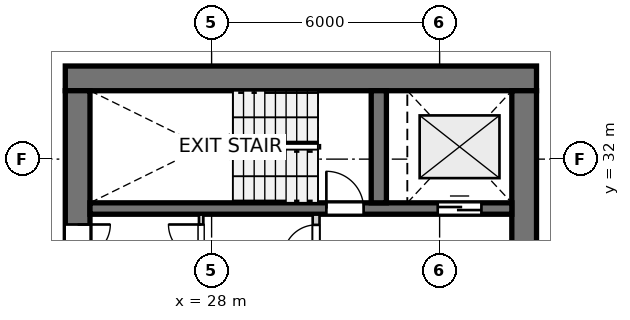
"""IFC4 building model, lengths in metres.
Left out: names, types, materials, properties, quantities, classifications, styles, units other than length and angle.
Written with IfcOpenShell. Run it as: python <this file> out.ifc"""

import sys

from ifc_helpers import new_model, si_unit, direction, frame, frame_2d, origin, place, context, subcontext, project, spatial, rectangle, extrude, source, transform, mapped, element, fill, save


model = new_model("IFC4")
c1 = context("Model", 3, precision=1e-05, world=origin(), true_north=direction((0.0, 1.0)))
c2 = subcontext(c1, "Body", "Model", "MODEL_VIEW")
j1 = project(units=[si_unit("LENGTHUNIT", "METRE"), si_unit("PLANEANGLEUNIT", "RADIAN")], contexts=[c1])
p1 = place(None, origin())
s1 = spatial("IfcSite", under=j1, at=p1, CompositionType="ELEMENT")
p2 = place(p1, origin())
s2 = spatial("IfcBuilding", under=s1, at=p2, CompositionType="ELEMENT")
p3 = place(p2, frame((0.0, 0.0, 108.8)))
s3 = spatial("IfcBuildingStorey", under=s2, at=p3, CompositionType="ELEMENT", Elevation=108.8)
p4 = place(p3, frame((36.55, 34.125, 0.0), z_axis=(0.0, 0.0, 1.0), x_axis=(-1.0, 0.0, 0.0)))
e1 = element("IfcWall", 1, at=p4, inside=s3, PredefinedType="SHEAR", context=c2, shape_type="SweptSolid", body=[
    extrude(rectangle(XDim=12.4, YDim=0.65, at=frame_2d((6.2, 0.0))), origin(), (0.0, 0.0, 1.0), 2.935),
])
p5 = place(p3, frame((24.475, 33.8, 0.0), z_axis=(0.0, 0.0, 1.0), x_axis=(0.0, -1.0, 0.0)))
e2 = element("IfcWall", 2, at=p5, inside=s3, PredefinedType="SHEAR", context=c2, shape_type="SweptSolid", body=[
    extrude(rectangle(XDim=15.6, YDim=0.65, at=frame_2d((7.8, 0.0))), origin(), (0.0, 0.0, 1.0), 2.935),
])
p6 = place(p5, frame((7.05, 0.0, 0.0)))
e3 = element("IfcOpeningElement", 3, at=p6, cuts=e2, PredefinedType="OPENING", context=c2, shape_type="SweptSolid", body=[
    extrude(rectangle(XDim=1.5, YDim=2.15, at=frame_2d((0.75, 1.075))), frame((0.0, 0.335, 0.0), z_axis=(0.0, -1.0, 0.0), x_axis=(1.0, 0.0, 0.0)), (0.0, 0.0, 1.0), 0.67),
])
p7 = place(p5, frame((3.52, 0.0, 0.0)))
e4 = element("IfcOpeningElement", 4, at=p7, cuts=e2, PredefinedType="OPENING", context=c2, shape_type="SweptSolid", body=[
    extrude(rectangle(XDim=0.86, YDim=2.05, at=frame_2d((0.43, 1.025))), frame((0.0, 0.335, 0.0), z_axis=(0.0, -1.0, 0.0), x_axis=(1.0, 0.0, 0.0)), (0.0, 0.0, 1.0), 0.67),
])
p8 = place(p5, frame((11.22, 0.0, 0.0)))
e5 = element("IfcOpeningElement", 5, at=p8, cuts=e2, PredefinedType="OPENING", context=c2, shape_type="SweptSolid", body=[
    extrude(rectangle(XDim=0.86, YDim=2.05, at=frame_2d((0.43, 1.025))), frame((0.0, 0.335, 0.0), z_axis=(0.0, -1.0, 0.0), x_axis=(1.0, 0.0, 0.0)), (0.0, 0.0, 1.0), 0.67),
])
p9 = place(p3, frame((36.225, 18.2, 0.0), z_axis=(0.0, 0.0, 1.0), x_axis=(0.0, 1.0, 0.0)))
e6 = element("IfcWall", 6, at=p9, inside=s3, PredefinedType="SHEAR", context=c2, shape_type="SweptSolid", body=[
    extrude(rectangle(XDim=15.6, YDim=0.65, at=frame_2d((7.8, 0.0))), origin(), (0.0, 0.0, 1.0), 2.935),
])
p10 = place(p9, frame((4.25, 0.0, 0.0)))
e7 = element("IfcOpeningElement", 7, at=p10, cuts=e6, PredefinedType="OPENING", context=c2, shape_type="SweptSolid", body=[
    extrude(rectangle(XDim=1.1, YDim=2.15, at=frame_2d((0.55, 1.075))), frame((0.0, 0.335, 0.0), z_axis=(0.0, -1.0, 0.0), x_axis=(1.0, 0.0, 0.0)), (0.0, 0.0, 1.0), 0.67),
])
p11 = place(p9, frame((10.25, 0.0, 0.0)))
e8 = element("IfcOpeningElement", 8, at=p11, cuts=e6, PredefinedType="OPENING", context=c2, shape_type="SweptSolid", body=[
    extrude(rectangle(XDim=1.1, YDim=2.15, at=frame_2d((0.55, 1.075))), frame((0.0, 0.335, 0.0), z_axis=(0.0, -1.0, 0.0), x_axis=(1.0, 0.0, 0.0)), (0.0, 0.0, 1.0), 0.67),
])
p12 = place(p3, frame((24.8, 30.7, 0.0), z_axis=(0.0, 0.0, 1.0), x_axis=(1.0, 0.0, 0.0)))
e9 = element("IfcWall", 9, at=p12, inside=s3, PredefinedType="SHEAR", context=c2, shape_type="SweptSolid", body=[
    extrude(rectangle(XDim=11.1, YDim=0.3, at=frame_2d((5.55, 0.0))), origin(), (0.0, 0.0, 1.0), 2.935),
])
p13 = place(p12, frame((6.22, 0.0, 0.0)))
e10 = element("IfcOpeningElement", 10, at=p13, cuts=e9, PredefinedType="OPENING", context=c2, shape_type="SweptSolid", body=[
    extrude(rectangle(XDim=0.98, YDim=2.15, at=frame_2d((0.49, 1.075))), frame((0.0, 0.16, 0.0), z_axis=(0.0, -1.0, 0.0), x_axis=(1.0, 0.0, 0.0)), (0.0, 0.0, 1.0), 0.32),
])
p14 = place(p12, frame((9.15, 0.0, 0.0)))
e11 = element("IfcOpeningElement", 11, at=p14, cuts=e9, PredefinedType="OPENING", context=c2, shape_type="SweptSolid", body=[
    extrude(rectangle(XDim=1.15, YDim=2.15, at=frame_2d((0.575, 1.075))), frame((0.0, 0.16, 0.0), z_axis=(0.0, -1.0, 0.0), x_axis=(1.0, 0.0, 0.0)), (0.0, 0.0, 1.0), 0.32),
])
p15 = place(p3, frame((32.4, 30.85, 0.0), z_axis=(0.0, 0.0, 1.0), x_axis=(0.0, 1.0, 0.0)))
e12 = element("IfcWall", 12, at=p15, inside=s3, PredefinedType="SHEAR", context=c2, shape_type="SweptSolid", body=[
    extrude(rectangle(XDim=2.95, YDim=0.4, at=frame_2d((1.475, 0.0))), origin(), (0.0, 0.0, 1.0), 2.935),
])
p16 = place(p3, frame((30.75, 27.43, 0.0), z_axis=(0.0, 0.0, 1.0), x_axis=(0.0, 1.0, 0.0)))
e13 = element("IfcWall", 13, at=p16, inside=s3, PredefinedType="PARTITIONING", context=c2, shape_type="SweptSolid", body=[
    extrude(rectangle(XDim=3.11, YDim=0.18, at=frame_2d((1.555, 0.0))), origin(), (0.0, 0.0, 1.0), 2.935),
])
p17 = place(p16, frame((1.98, 0.0, 0.0)))
e14 = element("IfcOpeningElement", 14, at=p17, cuts=e13, PredefinedType="OPENING", context=c2, shape_type="SweptSolid", body=[
    extrude(rectangle(XDim=0.86, YDim=2.05, at=frame_2d((0.43, 1.025))), frame((0.0, 0.1, 0.0), z_axis=(0.0, -1.0, 0.0), x_axis=(1.0, 0.0, 0.0)), (0.0, 0.0, 1.0), 0.2),
])
p18 = place(p3, frame((27.725, 29.16, 0.0), z_axis=(0.0, 0.0, 1.0), x_axis=(0.0, 1.0, 0.0)))
e15 = element("IfcWall", 15, at=p18, inside=s3, PredefinedType="PARTITIONING", context=c2, shape_type="SweptSolid", body=[
    extrude(rectangle(XDim=1.38, YDim=0.115, at=frame_2d((0.69, 0.0))), origin(), (0.0, 0.0, 1.0), 2.935),
])
p19 = place(p18, frame((0.26, 0.0, 0.0)))
e16 = element("IfcOpeningElement", 16, at=p19, cuts=e15, PredefinedType="OPENING", context=c2, shape_type="SweptSolid", body=[
    extrude(rectangle(XDim=0.86, YDim=2.05, at=frame_2d((0.43, 1.025))), frame((0.0, 0.067, 0.0), z_axis=(0.0, -1.0, 0.0), x_axis=(1.0, 0.0, 0.0)), (0.0, 0.0, 1.0), 0.135),
])
m1 = source(origin(), c2, "Body", "SweptSolid", [
    extrude(rectangle(XDim=0.98, YDim=2.15, at=frame_2d((0.49, 1.075))), frame((0.0, 0.025, 0.0), z_axis=(0.0, -1.0, 0.0), x_axis=(1.0, 0.0, 0.0)), (0.0, 0.0, 1.0), 0.05),
])
p20 = place(p13, origin())
e17 = element("IfcDoor", 17, at=p20, inside=s3, OperationType="SINGLE_SWING_LEFT", PredefinedType="DOOR", context=c2, shape_type="MappedRepresentation", body=[
    mapped(m1, transform((0.0, 0.0, 0.0), x_axis=(1.0, 0.0, 0.0), y_axis=(0.0, 1.0, 0.0), z_axis=(0.0, 0.0, 1.0), scale=1.0)),
])
fill(e10, e17)
m2 = source(origin(), c2, "Body", "SweptSolid", [
    extrude(rectangle(XDim=1.15, YDim=2.15, at=frame_2d((0.575, 1.075))), frame((0.0, 0.025, 0.0), z_axis=(0.0, -1.0, 0.0), x_axis=(1.0, 0.0, 0.0)), (0.0, 0.0, 1.0), 0.05),
])
p21 = place(p14, origin())
e18 = element("IfcDoor", 18, at=p21, inside=s3, OperationType="DOUBLE_DOOR_SLIDING", PredefinedType="DOOR", context=c2, shape_type="MappedRepresentation", body=[
    mapped(m2, transform((0.0, 0.0, 0.0), x_axis=(1.0, 0.0, 0.0), y_axis=(0.0, 1.0, 0.0), z_axis=(0.0, 0.0, 1.0), scale=1.0)),
])
fill(e11, e18)
m3 = source(origin(), c2, "Body", "SweptSolid", [
    extrude(rectangle(XDim=0.86, YDim=2.05, at=frame_2d((0.43, 1.025))), frame((0.0, 0.025, 0.0), z_axis=(0.0, -1.0, 0.0), x_axis=(1.0, 0.0, 0.0)), (0.0, 0.0, 1.0), 0.05),
])
p22 = place(p7, origin())
e19 = element("IfcDoor", 19, at=p22, inside=s3, OperationType="SINGLE_SWING_LEFT", PredefinedType="DOOR", context=c2, shape_type="MappedRepresentation", body=[
    mapped(m3, transform((0.0, 0.0, 0.0), x_axis=(1.0, 0.0, 0.0), y_axis=(0.0, 1.0, 0.0), z_axis=(0.0, 0.0, 1.0), scale=1.0)),
])
fill(e4, e19)
p23 = place(p17, origin())
e20 = element("IfcDoor", 20, at=p23, inside=s3, OperationType="SINGLE_SWING_LEFT", PredefinedType="DOOR", context=c2, shape_type="MappedRepresentation", body=[
    mapped(m3, transform((0.0, 0.0, 0.0), x_axis=(1.0, 0.0, 0.0), y_axis=(0.0, 1.0, 0.0), z_axis=(0.0, 0.0, 1.0), scale=1.0)),
])
fill(e14, e20)
p24 = place(p19, origin())
e21 = element("IfcDoor", 21, at=p24, inside=s3, OperationType="SINGLE_SWING_RIGHT", PredefinedType="DOOR", context=c2, shape_type="MappedRepresentation", body=[
    mapped(m3, transform((0.0, 0.0, 0.0), x_axis=(1.0, 0.0, 0.0), y_axis=(0.0, 1.0, 0.0), z_axis=(0.0, 0.0, 1.0), scale=1.0)),
])
fill(e16, e21)
save(model, sys.argv[1])
